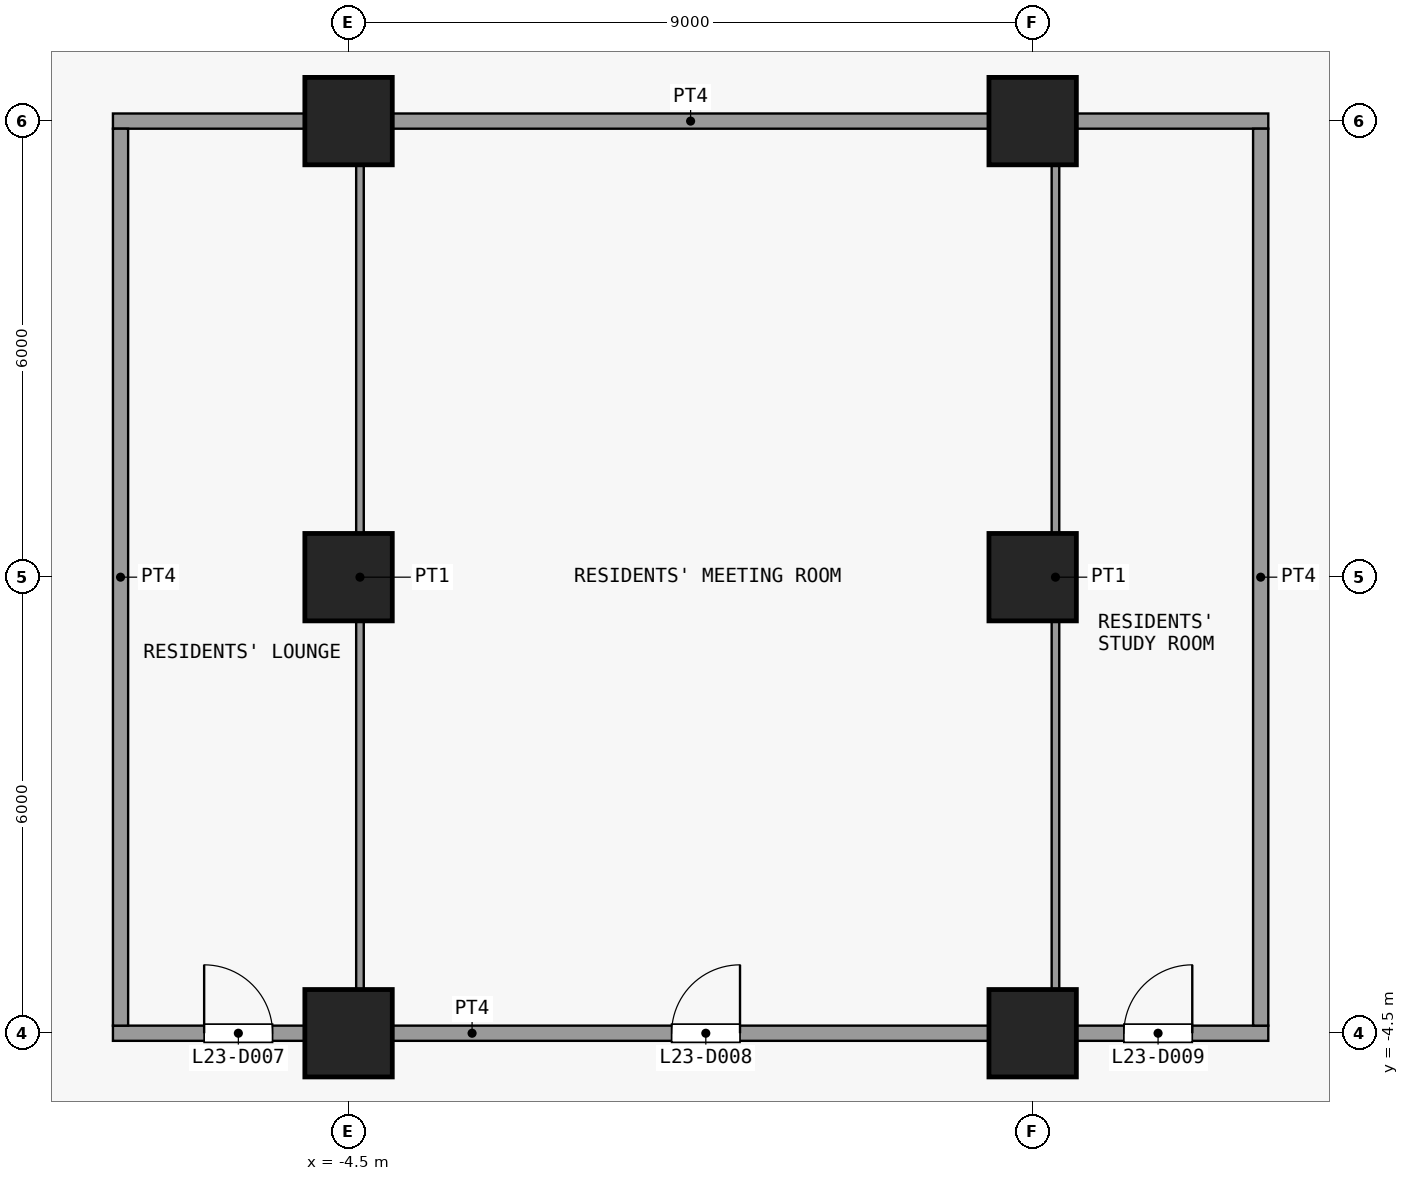
"""IFC4 building model, lengths in metres.
Left out: names, types, materials, properties, quantities, classifications, styles, units other than length and angle.
Written with IfcOpenShell. Run it as: python <this file> out.ifc"""

import sys

from ifc_helpers import new_model, si_unit, direction, frame, frame_2d, origin, origin_2d, place, context, subcontext, project, spatial, rectangle, extrude, element, fill, save


model = new_model("IFC4")
c1 = context("Model", 3, precision=1e-05, world=origin(), true_north=direction((0.0, 1.0)))
c2 = subcontext(c1, "Body", "Model", "MODEL_VIEW")
j1 = project(units=[si_unit("LENGTHUNIT", "METRE"), si_unit("PLANEANGLEUNIT", "RADIAN")], contexts=[c1])
p1 = place(None, origin())
s1 = spatial("IfcSite", under=j1, at=p1, CompositionType="ELEMENT")
p2 = place(p1, origin())
s2 = spatial("IfcBuilding", under=s1, at=p2, CompositionType="ELEMENT")
p3 = place(p2, frame((0.0, 0.0, 95.5)))
s3 = spatial("IfcBuildingStorey", under=s2, at=p3, CompositionType="ELEMENT", Elevation=95.5)
for number, where, z_axis, x_axis in (
    (1, (-4.5, -4.5, 0.0), (0.0, 0.0, 1.0), (1.0, 0.0, 0.0)),
    (2, (-4.5, 1.5, 0.0), (0.0, 0.0, 1.0), (1.0, 0.0, 0.0)),
    (3, (-4.5, 7.5, 0.0), (0.0, 0.0, 1.0), (1.0, 0.0, 0.0)),
    (4, (4.5, -4.5, 0.0), (0.0, 0.0, 1.0), (1.0, 0.0, 0.0)),
    (5, (4.5, 1.5, 0.0), (0.0, 0.0, 1.0), (1.0, 0.0, 0.0)),
    (6, (4.5, 7.5, 0.0), (0.0, 0.0, 1.0), (1.0, 0.0, 0.0)),
):
    element("IfcColumn", number, at=place(p3, frame(where, z_axis=z_axis, x_axis=x_axis)), inside=s3, PredefinedType="COLUMN", context=c2, shape_type="SweptSolid", body=[
        extrude(rectangle(XDim=1.15, YDim=1.15, at=origin_2d()), origin(), (0.0, 0.0, 1.0), 3.6),
    ])
p4 = place(p3, frame((-7.6, -4.5, 0.0), z_axis=(0.0, 0.0, 1.0), x_axis=(1.0, 0.0, 0.0)))
e7 = element("IfcWall", 7, at=p4, inside=s3, PredefinedType="PARTITIONING", context=c2, shape_type="SweptSolid", body=[
    extrude(rectangle(XDim=15.2, YDim=0.2, at=frame_2d((7.6, 0.0))), origin(), (0.0, 0.0, 1.0), 3.3),
])
p5 = place(p4, frame((1.2, 0.0, 0.0)))
e8 = element("IfcOpeningElement", 8, at=p5, cuts=e7, PredefinedType="OPENING", context=c2, shape_type="SweptSolid", body=[
    extrude(rectangle(XDim=0.9, YDim=2.1, at=frame_2d((0.45, 1.05))), frame((0.0, 0.11, 0.0), z_axis=(0.0, -1.0, 0.0), x_axis=(1.0, 0.0, 0.0)), (0.0, 0.0, 1.0), 0.22),
])
p6 = place(p4, frame((7.35, 0.0, 0.0)))
e9 = element("IfcOpeningElement", 9, at=p6, cuts=e7, PredefinedType="OPENING", context=c2, shape_type="SweptSolid", body=[
    extrude(rectangle(XDim=0.9, YDim=2.1, at=frame_2d((0.45, 1.05))), frame((0.0, 0.11, 0.0), z_axis=(0.0, -1.0, 0.0), x_axis=(1.0, 0.0, 0.0)), (0.0, 0.0, 1.0), 0.22),
])
p7 = place(p4, frame((13.3, 0.0, 0.0)))
e10 = element("IfcOpeningElement", 10, at=p7, cuts=e7, PredefinedType="OPENING", context=c2, shape_type="SweptSolid", body=[
    extrude(rectangle(XDim=0.9, YDim=2.1, at=frame_2d((0.45, 1.05))), frame((0.0, 0.11, 0.0), z_axis=(0.0, -1.0, 0.0), x_axis=(1.0, 0.0, 0.0)), (0.0, 0.0, 1.0), 0.22),
])
p8 = place(p3, frame((-7.6, 7.5, 0.0), z_axis=(0.0, 0.0, 1.0), x_axis=(1.0, 0.0, 0.0)))
e11 = element("IfcWall", 11, at=p8, inside=s3, PredefinedType="PARTITIONING", context=c2, shape_type="SweptSolid", body=[
    extrude(rectangle(XDim=15.2, YDim=0.2, at=frame_2d((7.6, 0.0))), origin(), (0.0, 0.0, 1.0), 3.3),
])
p9 = place(p3, frame((-7.5, -4.4, 0.0), z_axis=(0.0, 0.0, 1.0), x_axis=(0.0, 1.0, 0.0)))
e12 = element("IfcWall", 12, at=p9, inside=s3, PredefinedType="PARTITIONING", context=c2, shape_type="SweptSolid", body=[
    extrude(rectangle(XDim=11.8, YDim=0.2, at=frame_2d((5.9, 0.0))), origin(), (0.0, 0.0, 1.0), 3.3),
])
for number, where, z_axis, x_axis in (
    (13, (-4.35, -4.4, 0.0), (0.0, 0.0, 1.0), (0.0, 1.0, 0.0)),
    (14, (4.8, -4.4, 0.0), (0.0, 0.0, 1.0), (0.0, 1.0, 0.0)),
):
    element("IfcWall", number, at=place(p3, frame(where, z_axis=z_axis, x_axis=x_axis)), inside=s3, PredefinedType="PARTITIONING", context=c2, shape_type="SweptSolid", body=[
        extrude(rectangle(XDim=11.8, YDim=0.1, at=frame_2d((5.9, 0.0))), origin(), (0.0, 0.0, 1.0), 3.3),
    ])
p10 = place(p3, frame((7.5, -4.4, 0.0), z_axis=(0.0, 0.0, 1.0), x_axis=(0.0, 1.0, 0.0)))
e15 = element("IfcWall", 15, at=p10, inside=s3, PredefinedType="PARTITIONING", context=c2, shape_type="SweptSolid", body=[
    extrude(rectangle(XDim=11.8, YDim=0.2, at=frame_2d((5.9, 0.0))), origin(), (0.0, 0.0, 1.0), 3.3),
])
p11 = place(p5, origin())
e16 = element("IfcDoor", 16, at=p11, inside=s3, OperationType="SINGLE_SWING_RIGHT", PredefinedType="DOOR", context=c2, shape_type="SweptSolid", body=[
    extrude(rectangle(XDim=0.9, YDim=2.1, at=frame_2d((0.45, 1.05))), frame((0.0, 0.025, 0.0), z_axis=(0.0, -1.0, 0.0), x_axis=(1.0, 0.0, 0.0)), (0.0, 0.0, 1.0), 0.05),
])
fill(e8, e16)
p12 = place(p6, origin())
e17 = element("IfcDoor", 17, at=p12, inside=s3, OperationType="SINGLE_SWING_LEFT", PredefinedType="DOOR", context=c2, shape_type="SweptSolid", body=[
    extrude(rectangle(XDim=0.9, YDim=2.1, at=frame_2d((0.45, 1.05))), frame((0.0, 0.025, 0.0), z_axis=(0.0, -1.0, 0.0), x_axis=(1.0, 0.0, 0.0)), (0.0, 0.0, 1.0), 0.05),
])
fill(e9, e17)
p13 = place(p7, origin())
e18 = element("IfcDoor", 18, at=p13, inside=s3, OperationType="SINGLE_SWING_LEFT", PredefinedType="DOOR", context=c2, shape_type="SweptSolid", body=[
    extrude(rectangle(XDim=0.9, YDim=2.1, at=frame_2d((0.45, 1.05))), frame((0.0, 0.025, 0.0), z_axis=(0.0, -1.0, 0.0), x_axis=(1.0, 0.0, 0.0)), (0.0, 0.0, 1.0), 0.05),
])
fill(e10, e18)
save(model, sys.argv[1])
